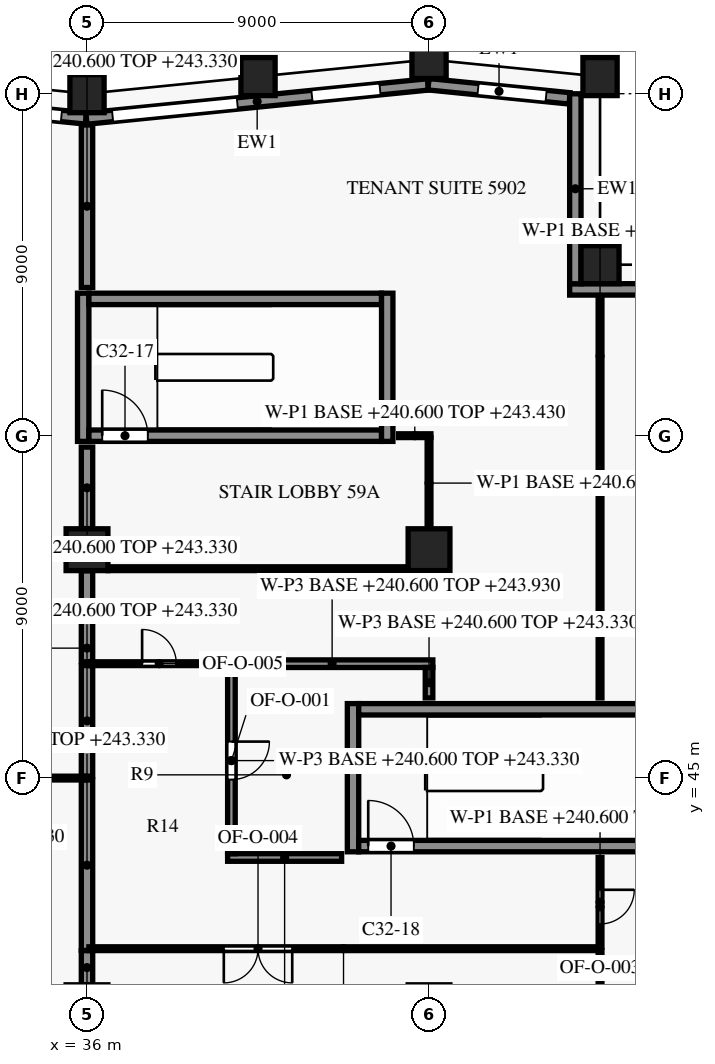
"""IFC4 building model, lengths in metres.
Left out: names, types, materials, properties, quantities, classifications, styles, units other than length and angle.
Written with IfcOpenShell. Run it as: python <this file> out.ifc"""

import sys

from ifc_helpers import new_model, si_unit, direction, frame, frame_2d, origin, origin_2d, place, context, subcontext, project, spatial, rectangle, extrude, element, fill, save


model = new_model("IFC4")
c1 = context("Model", 3, precision=1e-05, world=origin(), true_north=direction((0.0, 1.0)))
c2 = subcontext(c1, "Body", "Model", "MODEL_VIEW")
j1 = project(units=[si_unit("LENGTHUNIT", "METRE"), si_unit("PLANEANGLEUNIT", "RADIAN")], contexts=[c1])
p1 = place(None, origin())
s1 = spatial("IfcSite", under=j1, at=p1, CompositionType="ELEMENT")
p2 = place(p1, origin())
s2 = spatial("IfcBuilding", under=s1, at=p2, CompositionType="ELEMENT")
p3 = place(p2, frame((0.0, 0.0, 240.6)))
s3 = spatial("IfcBuildingStorey", under=s2, at=p3, CompositionType="ELEMENT", Elevation=240.6)
for number, where, z_axis, x_axis in (
    (1, (49.5, 63.45, 0.0), (0.0, 0.0, 1.0), (-0.995, 0.1, 0.0)),
    (2, (45.0, 63.9, 0.0), (0.0, 0.0, 1.0), (-1.0, 0.0, 0.0)),
    (3, (40.5, 63.45, 0.0), (0.0, 0.0, 1.0), (-0.995, -0.1, 0.0)),
    (4, (36.0, 63.0, 0.0), (0.0, 0.0, 1.0), (-1.0, 0.0, 0.0)),
):
    element("IfcColumn", number, at=place(p3, frame(where, z_axis=z_axis, x_axis=x_axis)), inside=s3, PredefinedType="COLUMN", context=c2, shape_type="SweptSolid", body=[
        extrude(rectangle(XDim=0.9, YDim=1.0, at=origin_2d()), origin(), (0.0, 0.0, 1.0), 3.8),
    ])
p4 = place(p3, frame((49.5, 58.5, 0.0), z_axis=(0.0, 0.0, 1.0), x_axis=(1.0, 0.0, 0.0)))
e5 = element("IfcColumn", 5, at=p4, inside=s3, PredefinedType="COLUMN", context=c2, shape_type="SweptSolid", body=[
    extrude(rectangle(XDim=1.0, YDim=1.0, at=origin_2d()), origin(), (0.0, 0.0, 1.0), 3.8),
])
for number, where, z_axis, x_axis in (
    (6, (36.0, 51.0, 0.0), (0.0, 0.0, 1.0), (1.0, 0.0, 0.0)),
    (7, (45.0, 51.0, 0.0), (0.0, 0.0, 1.0), (1.0, 0.0, 0.0)),
):
    element("IfcColumn", number, at=place(p3, frame(where, z_axis=z_axis, x_axis=x_axis)), inside=s3, PredefinedType="COLUMN", context=c2, shape_type="SweptSolid", body=[
        extrude(rectangle(XDim=1.1, YDim=1.1, at=origin_2d()), origin(), (0.0, 0.0, 1.0), 3.8),
    ])
p5 = place(p3, frame((48.7, 57.85, 0.0), z_axis=(0.0, 0.0, 1.0), x_axis=(1.0, 0.0, 0.0)))
e8 = element("IfcWall", 8, at=p5, inside=s3, PredefinedType="SOLIDWALL", context=c2, shape_type="SweptSolid", body=[
    extrude(rectangle(XDim=4.502, YDim=0.3, at=frame_2d((2.251, 0.0))), origin(), (0.0, 0.0, 1.0), 3.15),
])
p6 = place(p3, frame((48.85, 62.998, 0.0), z_axis=(0.0, 0.0, 1.0), x_axis=(0.0, -1.0, 0.0)))
e9 = element("IfcWall", 9, at=p6, inside=s3, PredefinedType="SOLIDWALL", context=c2, shape_type="SweptSolid", body=[
    extrude(rectangle(XDim=5.0, YDim=0.3, at=frame_2d((2.5, 0.0))), origin(), (0.0, 0.0, 1.0), 3.15),
])
p7 = place(p3, frame((44.985, 63.248, 0.0), z_axis=(0.0, 0.0, 1.0), x_axis=(0.995037837869, -0.099497242219, 0.0)))
e10 = element("IfcWall", 10, at=p7, inside=s3, PredefinedType="SOLIDWALL", context=c2, shape_type="SweptSolid", body=[
    extrude(rectangle(XDim=3.732, YDim=0.3, at=frame_2d((1.866, 0.0))), origin(), (0.0, 0.0, 1.0), 3.15),
])
p8 = place(p7, frame((1.311, 0.0, 0.75)))
e11 = element("IfcOpeningElement", 11, at=p8, cuts=e10, PredefinedType="OPENING", context=c2, shape_type="SweptSolid", body=[
    extrude(rectangle(XDim=1.8, YDim=1.8, at=frame_2d((0.9, 0.9))), frame((0.0, 0.16, 0.0), z_axis=(0.0, -1.0, 0.0), x_axis=(1.0, 0.0, 0.0)), (0.0, 0.0, 1.0), 0.32),
])
p9 = place(p3, frame((35.985, 62.345, 0.0), z_axis=(0.0, 0.0, 1.0), x_axis=(0.995035316196, 0.099522457379, 0.0)))
e12 = element("IfcWall", 12, at=p9, inside=s3, PredefinedType="SOLIDWALL", context=c2, shape_type="SweptSolid", body=[
    extrude(rectangle(XDim=9.03, YDim=0.3, at=frame_2d((4.515, 0.0))), origin(), (0.0, 0.0, 1.0), 3.15),
])
p10 = place(p9, frame((0.691, 0.0, 0.15)))
e13 = element("IfcOpeningElement", 13, at=p10, cuts=e12, PredefinedType="OPENING", context=c2, shape_type="SweptSolid", body=[
    extrude(rectangle(XDim=3.3, YDim=2.4, at=frame_2d((1.65, 1.2))), frame((0.0, 0.16, 0.0), z_axis=(0.0, -1.0, 0.0), x_axis=(1.0, 0.0, 0.0)), (0.0, 0.0, 1.0), 0.32),
])
p11 = place(p9, frame((5.964, 0.0, 0.75)))
e14 = element("IfcOpeningElement", 14, at=p11, cuts=e12, PredefinedType="OPENING", context=c2, shape_type="SweptSolid", body=[
    extrude(rectangle(XDim=1.8, YDim=1.8, at=frame_2d((0.9, 0.9))), frame((0.0, 0.16, 0.0), z_axis=(0.0, -1.0, 0.0), x_axis=(1.0, 0.0, 0.0)), (0.0, 0.0, 1.0), 0.32),
])
p12 = place(p3, frame((27.085, 63.238, 0.0), z_axis=(0.0, 0.0, 1.0), x_axis=(0.995035836657, -0.099517253618, 0.0)))
e15 = element("IfcWall", 15, at=p12, inside=s3, PredefinedType="SOLIDWALL", context=c2, shape_type="SweptSolid", body=[
    extrude(rectangle(XDim=8.93, YDim=0.3, at=frame_2d((4.465, 0.0))), origin(), (0.0, 0.0, 1.0), 3.15),
])
p13 = place(p12, frame((1.211, 0.0, 0.75)))
e16 = element("IfcOpeningElement", 16, at=p13, cuts=e15, PredefinedType="OPENING", context=c2, shape_type="SweptSolid", body=[
    extrude(rectangle(XDim=1.8, YDim=1.8, at=frame_2d((0.9, 0.9))), frame((0.0, 0.16, 0.0), z_axis=(0.0, -1.0, 0.0), x_axis=(1.0, 0.0, 0.0)), (0.0, 0.0, 1.0), 0.32),
])
p14 = place(p12, frame((4.984, 0.0, 0.15)))
e17 = element("IfcOpeningElement", 17, at=p14, cuts=e15, PredefinedType="OPENING", context=c2, shape_type="SweptSolid", body=[
    extrude(rectangle(XDim=3.3, YDim=2.4, at=frame_2d((1.65, 1.2))), frame((0.0, 0.16, 0.0), z_axis=(0.0, -1.0, 0.0), x_axis=(1.0, 0.0, 0.0)), (0.0, 0.0, 1.0), 0.32),
])
p15 = place(p3, frame((43.15, 43.2, 0.0), z_axis=(0.0, 0.0, 1.0), x_axis=(1.0, 0.0, 0.0)))
e18 = element("IfcWall", 18, at=p15, inside=s3, PredefinedType="SHEAR", context=c2, shape_type="SweptSolid", body=[
    extrude(rectangle(XDim=7.7, YDim=0.3, at=frame_2d((3.85, 0.0))), origin(), (0.0, 0.0, 1.0), 3.5),
])
p16 = place(p15, frame((0.25, 0.0, 0.0)))
e19 = element("IfcOpeningElement", 19, at=p16, cuts=e18, PredefinedType="OPENING", context=c2, shape_type="SweptSolid", body=[
    extrude(rectangle(XDim=1.2, YDim=2.2, at=frame_2d((0.6, 1.1))), frame((0.0, 0.16, 0.0), z_axis=(0.0, -1.0, 0.0), x_axis=(1.0, 0.0, 0.0)), (0.0, 0.0, 1.0), 0.32),
])
p17 = place(p3, frame((43.15, 46.8, 0.0), z_axis=(0.0, 0.0, 1.0), x_axis=(1.0, 0.0, 0.0)))
e20 = element("IfcWall", 20, at=p17, inside=s3, PredefinedType="SHEAR", context=c2, shape_type="SweptSolid", body=[
    extrude(rectangle(XDim=7.7, YDim=0.3, at=frame_2d((3.85, 0.0))), origin(), (0.0, 0.0, 1.0), 3.5),
])
p18 = place(p3, frame((36.05, 54.0, 0.0), z_axis=(0.0, 0.0, 1.0), x_axis=(1.0, 0.0, 0.0)))
e21 = element("IfcWall", 21, at=p18, inside=s3, PredefinedType="SHEAR", context=c2, shape_type="SweptSolid", body=[
    extrude(rectangle(XDim=7.7, YDim=0.3, at=frame_2d((3.85, 0.0))), origin(), (0.0, 0.0, 1.0), 3.5),
])
p19 = place(p18, frame((0.35, 0.0, 0.0)))
e22 = element("IfcOpeningElement", 22, at=p19, cuts=e21, PredefinedType="OPENING", context=c2, shape_type="SweptSolid", body=[
    extrude(rectangle(XDim=1.2, YDim=2.2, at=frame_2d((0.6, 1.1))), frame((0.0, 0.16, 0.0), z_axis=(0.0, -1.0, 0.0), x_axis=(1.0, 0.0, 0.0)), (0.0, 0.0, 1.0), 0.32),
])
p20 = place(p3, frame((36.05, 57.6, 0.0), z_axis=(0.0, 0.0, 1.0), x_axis=(1.0, 0.0, 0.0)))
e23 = element("IfcWall", 23, at=p20, inside=s3, PredefinedType="SHEAR", context=c2, shape_type="SweptSolid", body=[
    extrude(rectangle(XDim=7.7, YDim=0.3, at=frame_2d((3.85, 0.0))), origin(), (0.0, 0.0, 1.0), 3.5),
])
for number, where, z_axis, x_axis in (
    (24, (35.9, 53.85, 0.0), (0.0, 0.0, 1.0), (0.0, 1.0, 0.0)),
    (25, (43.0, 43.05, 0.0), (0.0, 0.0, 1.0), (0.0, 1.0, 0.0)),
    (26, (43.9, 53.85, 0.0), (0.0, 0.0, 1.0), (0.0, 1.0, 0.0)),
):
    element("IfcWall", number, at=place(p3, frame(where, z_axis=z_axis, x_axis=x_axis)), inside=s3, PredefinedType="SHEAR", context=c2, shape_type="SweptSolid", body=[
        extrude(rectangle(XDim=3.9, YDim=0.3, at=frame_2d((1.95, 0.0))), origin(), (0.0, 0.0, 1.0), 3.5),
    ])
p21 = place(p3, frame((49.5, 32.32, 0.0), z_axis=(0.0, 0.0, 1.0), x_axis=(0.0, 1.0, 0.0)))
e27 = element("IfcWall", 27, at=p21, inside=s3, PredefinedType="PARTITIONING", context=c2, shape_type="SweptSolid", body=[
    extrude(rectangle(XDim=8.13, YDim=0.1, at=frame_2d((4.065, 0.0))), origin(), (0.0, 0.0, 1.0), 2.73),
])
p22 = place(p3, frame((36.0, 39.555, 0.0), z_axis=(0.0, 0.0, 1.0), x_axis=(0.0, 1.0, 0.0)))
e28 = element("IfcWall", 28, at=p22, inside=s3, PredefinedType="PARTITIONING", context=c2, shape_type="SweptSolid", body=[
    extrude(rectangle(XDim=0.895, YDim=0.3, at=frame_2d((0.448, 0.0))), origin(), (0.0, 0.0, 1.0), 2.73),
])
p23 = place(p3, frame((49.45, 40.5, 0.0), z_axis=(0.0, 0.0, 1.0), x_axis=(-1.0, 0.0, 0.0)))
e29 = element("IfcWall", 29, at=p23, inside=s3, PredefinedType="PARTITIONING", context=c2, shape_type="SweptSolid", body=[
    extrude(rectangle(XDim=13.4, YDim=0.1, at=frame_2d((6.7, 0.0))), origin(), (0.0, 0.0, 1.0), 2.73),
])
p24 = place(p23, frame((8.05, 0.0, 0.0)))
e30 = element("IfcOpeningElement", 30, at=p24, cuts=e29, PredefinedType="OPENING", context=c2, shape_type="SweptSolid", body=[
    extrude(rectangle(XDim=1.8, YDim=2.1, at=frame_2d((0.9, 1.05))), frame((0.0, 0.06, 0.0), z_axis=(0.0, -1.0, 0.0), x_axis=(1.0, 0.0, 0.0)), (0.0, 0.0, 1.0), 0.12),
])
p25 = place(p3, frame((36.0, 40.455, 0.0), z_axis=(0.0, 0.0, 1.0), x_axis=(0.0, 1.0, 0.0)))
e31 = element("IfcWall", 31, at=p25, inside=s3, PredefinedType="PARTITIONING", context=c2, shape_type="SweptSolid", body=[
    extrude(rectangle(XDim=4.485, YDim=0.3, at=frame_2d((2.242, 0.0))), origin(), (0.0, 0.0, 1.0), 2.73),
])
p26 = place(p3, frame((39.7, 42.9, 0.0), z_axis=(0.0, 0.0, 1.0), x_axis=(1.0, 0.0, 0.0)))
e32 = element("IfcWall", 32, at=p26, inside=s3, PredefinedType="PARTITIONING", context=c2, shape_type="SweptSolid", body=[
    extrude(rectangle(XDim=3.0, YDim=0.2, at=frame_2d((1.5, 0.0))), origin(), (0.0, 0.0, 1.0), 2.73),
])
p27 = place(p3, frame((49.5, 42.9, 0.0), z_axis=(0.0, 0.0, 1.0), x_axis=(0.0, -1.0, 0.0)))
e33 = element("IfcWall", 33, at=p27, inside=s3, PredefinedType="PARTITIONING", context=c2, shape_type="SweptSolid", body=[
    extrude(rectangle(XDim=2.35, YDim=0.1, at=frame_2d((1.175, 0.0))), origin(), (0.0, 0.0, 1.0), 2.73),
])
p28 = place(p27, frame((0.85, 0.0, 0.0)))
e34 = element("IfcOpeningElement", 34, at=p28, cuts=e33, PredefinedType="OPENING", context=c2, shape_type="SweptSolid", body=[
    extrude(rectangle(XDim=0.9, YDim=2.1, at=frame_2d((0.45, 1.05))), frame((0.0, 0.06, 0.0), z_axis=(0.0, -1.0, 0.0), x_axis=(1.0, 0.0, 0.0)), (0.0, 0.0, 1.0), 0.12),
])
p29 = place(p3, frame((30.05, 44.99, 0.0), z_axis=(0.0, 0.0, 1.0), x_axis=(1.0, 0.0, 0.0)))
e35 = element("IfcWall", 35, at=p29, inside=s3, PredefinedType="PARTITIONING", context=c2, shape_type="SweptSolid", body=[
    extrude(rectangle(XDim=5.9, YDim=0.1, at=frame_2d((2.95, 0.0))), origin(), (0.0, 0.0, 1.0), 2.73),
])
p30 = place(p3, frame((36.0, 45.04, 0.0), z_axis=(0.0, 0.0, 1.0), x_axis=(0.0, 1.0, 0.0)))
e36 = element("IfcWall", 36, at=p30, inside=s3, PredefinedType="PARTITIONING", context=c2, shape_type="SweptSolid", body=[
    extrude(rectangle(XDim=2.91, YDim=0.3, at=frame_2d((1.455, 0.0))), origin(), (0.0, 0.0, 1.0), 2.73),
])
p31 = place(p3, frame((49.5, 47.1, 0.0), z_axis=(0.0, 0.0, 1.0), x_axis=(0.0, 1.0, 0.0)))
e37 = element("IfcWall", 37, at=p31, inside=s3, PredefinedType="PARTITIONING", context=c2, shape_type="SweptSolid", body=[
    extrude(rectangle(XDim=10.58, YDim=0.1, at=frame_2d((5.29, 0.0))), origin(), (0.0, 0.0, 1.0), 2.73),
])
p32 = place(p3, frame((39.8, 47.9, 0.0), z_axis=(0.0, 0.0, 1.0), x_axis=(0.0, -1.0, 0.0)))
e38 = element("IfcWall", 38, at=p32, inside=s3, PredefinedType="PARTITIONING", context=c2, shape_type="SweptSolid", body=[
    extrude(rectangle(XDim=4.9, YDim=0.2, at=frame_2d((2.45, 0.0))), origin(), (0.0, 0.0, 1.0), 2.73),
])
p33 = place(p32, frame((1.95, 0.0, 0.0)))
e39 = element("IfcOpeningElement", 39, at=p33, cuts=e38, PredefinedType="OPENING", context=c2, shape_type="SweptSolid", body=[
    extrude(rectangle(XDim=1.0, YDim=2.1, at=frame_2d((0.5, 1.05))), frame((0.0, 0.11, 0.0), z_axis=(0.0, -1.0, 0.0), x_axis=(1.0, 0.0, 0.0)), (0.0, 0.0, 1.0), 0.22),
])
p34 = place(p3, frame((45.0, 47.9, 0.0), z_axis=(0.0, 0.0, 1.0), x_axis=(0.0, -1.0, 0.0)))
e40 = element("IfcWall", 40, at=p34, inside=s3, PredefinedType="PARTITIONING", context=c2, shape_type="SweptSolid", body=[
    extrude(rectangle(XDim=0.8, YDim=0.2, at=frame_2d((0.4, 0.0))), origin(), (0.0, 0.0, 1.0), 2.73),
])
p35 = place(p3, frame((36.05, 48.0, 0.0), z_axis=(0.0, 0.0, 1.0), x_axis=(1.0, 0.0, 0.0)))
e41 = element("IfcWall", 41, at=p35, inside=s3, PredefinedType="PARTITIONING", context=c2, shape_type="SweptSolid", body=[
    extrude(rectangle(XDim=3.75, YDim=0.1, at=frame_2d((1.875, 0.0))), origin(), (0.0, 0.0, 1.0), 2.73),
])
p36 = place(p35, frame((1.4, 0.0, 0.0)))
e42 = element("IfcOpeningElement", 42, at=p36, cuts=e41, PredefinedType="OPENING", context=c2, shape_type="SweptSolid", body=[
    extrude(rectangle(XDim=0.9, YDim=2.1, at=frame_2d((0.45, 1.05))), frame((0.0, 0.06, 0.0), z_axis=(0.0, -1.0, 0.0), x_axis=(1.0, 0.0, 0.0)), (0.0, 0.0, 1.0), 0.12),
])
p37 = place(p3, frame((39.8, 48.0, 0.0), z_axis=(0.0, 0.0, 1.0), x_axis=(1.0, 0.0, 0.0)))
e43 = element("IfcWall", 43, at=p37, inside=s3, PredefinedType="PARTITIONING", context=c2, shape_type="SweptSolid", body=[
    extrude(rectangle(XDim=5.3, YDim=0.2, at=frame_2d((2.65, 0.0))), origin(), (0.0, 0.0, 1.0), 3.33),
])
p38 = place(p3, frame((36.0, 48.05, 0.0), z_axis=(0.0, 0.0, 1.0), x_axis=(0.0, 1.0, 0.0)))
e44 = element("IfcWall", 44, at=p38, inside=s3, PredefinedType="PARTITIONING", context=c2, shape_type="SweptSolid", body=[
    extrude(rectangle(XDim=2.395, YDim=0.3, at=frame_2d((1.198, 0.0))), origin(), (0.0, 0.0, 1.0), 2.73),
])
p39 = place(p3, frame((44.445, 50.5, 0.0), z_axis=(0.0, 0.0, 1.0), x_axis=(-1.0, 0.0, 0.0)))
e45 = element("IfcWall", 45, at=p39, inside=s3, PredefinedType="PARTITIONING", context=c2, shape_type="SweptSolid", body=[
    extrude(rectangle(XDim=7.89, YDim=0.1, at=frame_2d((3.945, 0.0))), origin(), (0.0, 0.0, 1.0), 3.33),
])
p40 = place(p3, frame((36.0, 51.555, 0.0), z_axis=(0.0, 0.0, 1.0), x_axis=(0.0, 1.0, 0.0)))
e46 = element("IfcWall", 46, at=p40, inside=s3, PredefinedType="PARTITIONING", context=c2, shape_type="SweptSolid", body=[
    extrude(rectangle(XDim=2.145, YDim=0.3, at=frame_2d((1.073, 0.0))), origin(), (0.0, 0.0, 1.0), 2.73),
])
p41 = place(p3, frame((45.0, 53.95, 0.0), z_axis=(0.0, 0.0, 1.0), x_axis=(0.0, -1.0, 0.0)))
e47 = element("IfcWall", 47, at=p41, inside=s3, PredefinedType="PARTITIONING", context=c2, shape_type="SweptSolid", body=[
    extrude(rectangle(XDim=2.395, YDim=0.1, at=frame_2d((1.198, 0.0))), origin(), (0.0, 0.0, 1.0), 2.83),
])
p42 = place(p3, frame((44.2, 54.0, 0.0), z_axis=(0.0, 0.0, 1.0), x_axis=(1.0, 0.0, 0.0)))
e48 = element("IfcWall", 48, at=p42, inside=s3, PredefinedType="PARTITIONING", context=c2, shape_type="SweptSolid", body=[
    extrude(rectangle(XDim=0.85, YDim=0.1, at=frame_2d((0.425, 0.0))), origin(), (0.0, 0.0, 1.0), 2.83),
])
p43 = place(p3, frame((36.0, 57.9, 0.0), z_axis=(0.0, 0.0, 1.0), x_axis=(0.0, 1.0, 0.0)))
e49 = element("IfcWall", 49, at=p43, inside=s3, PredefinedType="PARTITIONING", context=c2, shape_type="SweptSolid", body=[
    extrude(rectangle(XDim=4.276, YDim=0.3, at=frame_2d((2.138, 0.0))), origin(), (0.0, 0.0, 1.0), 2.73),
])
p44 = place(p8, origin())
e50 = element("IfcWindow", 50, at=p44, inside=s3, PartitioningType="SINGLE_PANEL", PredefinedType="WINDOW", context=c2, shape_type="SweptSolid", body=[
    extrude(rectangle(XDim=1.8, YDim=1.8, at=frame_2d((0.9, 0.9))), frame((0.0, 0.03, 0.0), z_axis=(0.0, -1.0, 0.0), x_axis=(1.0, 0.0, 0.0)), (0.0, 0.0, 1.0), 0.06),
])
fill(e11, e50)
p45 = place(p10, origin())
e51 = element("IfcWindow", 51, at=p45, inside=s3, PartitioningType="SINGLE_PANEL", PredefinedType="WINDOW", context=c2, shape_type="SweptSolid", body=[
    extrude(rectangle(XDim=3.3, YDim=2.4, at=frame_2d((1.65, 1.2))), frame((0.0, 0.03, 0.0), z_axis=(0.0, -1.0, 0.0), x_axis=(1.0, 0.0, 0.0)), (0.0, 0.0, 1.0), 0.06),
])
fill(e13, e51)
p46 = place(p11, origin())
e52 = element("IfcWindow", 52, at=p46, inside=s3, PartitioningType="SINGLE_PANEL", PredefinedType="WINDOW", context=c2, shape_type="SweptSolid", body=[
    extrude(rectangle(XDim=1.8, YDim=1.8, at=frame_2d((0.9, 0.9))), frame((0.0, 0.03, 0.0), z_axis=(0.0, -1.0, 0.0), x_axis=(1.0, 0.0, 0.0)), (0.0, 0.0, 1.0), 0.06),
])
fill(e14, e52)
p47 = place(p14, origin())
e53 = element("IfcWindow", 53, at=p47, inside=s3, PartitioningType="SINGLE_PANEL", PredefinedType="WINDOW", context=c2, shape_type="SweptSolid", body=[
    extrude(rectangle(XDim=3.3, YDim=2.4, at=frame_2d((1.65, 1.2))), frame((0.0, 0.03, 0.0), z_axis=(0.0, -1.0, 0.0), x_axis=(1.0, 0.0, 0.0)), (0.0, 0.0, 1.0), 0.06),
])
fill(e17, e53)
p48 = place(p19, origin())
e54 = element("IfcDoor", 54, at=p48, inside=s3, OperationType="SINGLE_SWING_LEFT", PredefinedType="DOOR", context=c2, shape_type="SweptSolid", body=[
    extrude(rectangle(XDim=1.2, YDim=2.2, at=frame_2d((0.6, 1.1))), frame((0.0, 0.025, 0.0), z_axis=(0.0, -1.0, 0.0), x_axis=(1.0, 0.0, 0.0)), (0.0, 0.0, 1.0), 0.05),
])
fill(e22, e54)
p49 = place(p16, origin())
e55 = element("IfcDoor", 55, at=p49, inside=s3, OperationType="SINGLE_SWING_RIGHT", PredefinedType="DOOR", context=c2, shape_type="SweptSolid", body=[
    extrude(rectangle(XDim=1.2, YDim=2.2, at=frame_2d((0.6, 1.1))), frame((0.0, 0.025, 0.0), z_axis=(0.0, -1.0, 0.0), x_axis=(1.0, 0.0, 0.0)), (0.0, 0.0, 1.0), 0.05),
])
fill(e19, e55)
p50 = place(p33, origin())
e56 = element("IfcDoor", 56, at=p50, inside=s3, OperationType="SINGLE_SWING_RIGHT", PredefinedType="DOOR", context=c2, shape_type="SweptSolid", body=[
    extrude(rectangle(XDim=1.0, YDim=2.1, at=frame_2d((0.5, 1.05))), frame((0.0, 0.025, 0.0), z_axis=(0.0, -1.0, 0.0), x_axis=(1.0, 0.0, 0.0)), (0.0, 0.0, 1.0), 0.05),
])
fill(e39, e56)
p51 = place(p28, origin())
e57 = element("IfcDoor", 57, at=p51, inside=s3, OperationType="SINGLE_SWING_LEFT", PredefinedType="DOOR", context=c2, shape_type="SweptSolid", body=[
    extrude(rectangle(XDim=0.9, YDim=2.1, at=frame_2d((0.45, 1.05))), frame((0.0, 0.025, 0.0), z_axis=(0.0, -1.0, 0.0), x_axis=(1.0, 0.0, 0.0)), (0.0, 0.0, 1.0), 0.05),
])
fill(e34, e57)
p52 = place(p24, origin())
e58 = element("IfcDoor", 58, at=p52, inside=s3, OperationType="DOUBLE_DOOR_SINGLE_SWING", PredefinedType="DOOR", context=c2, shape_type="SweptSolid", body=[
    extrude(rectangle(XDim=1.8, YDim=2.1, at=frame_2d((0.9, 1.05))), frame((0.0, 0.025, 0.0), z_axis=(0.0, -1.0, 0.0), x_axis=(1.0, 0.0, 0.0)), (0.0, 0.0, 1.0), 0.05),
])
fill(e30, e58)
p53 = place(p36, origin())
e59 = element("IfcDoor", 59, at=p53, inside=s3, OperationType="SINGLE_SWING_LEFT", PredefinedType="DOOR", context=c2, shape_type="SweptSolid", body=[
    extrude(rectangle(XDim=0.9, YDim=2.1, at=frame_2d((0.45, 1.05))), frame((0.0, 0.025, 0.0), z_axis=(0.0, -1.0, 0.0), x_axis=(1.0, 0.0, 0.0)), (0.0, 0.0, 1.0), 0.05),
])
fill(e42, e59)
save(model, sys.argv[1])
